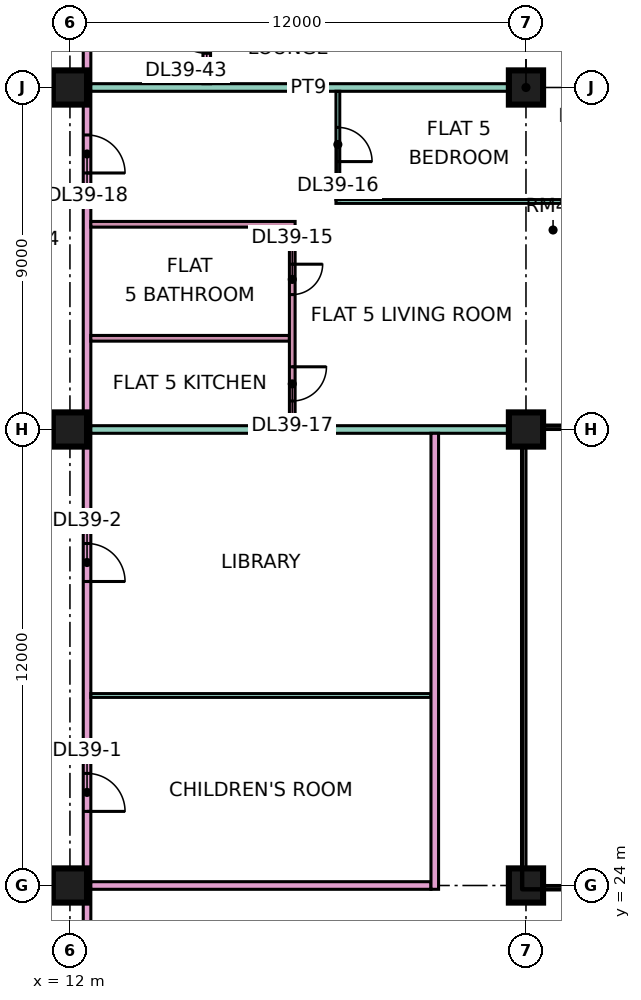
"""IFC4 building model, lengths in metres.
Left out: names, types, materials, properties, quantities, classifications, styles, units other than length and angle.
Written with IfcOpenShell. Run it as: python <this file> out.ifc"""

import sys

from ifc_helpers import new_model, si_unit, direction, frame, frame_2d, origin, origin_2d, place, context, subcontext, project, spatial, rectangle, extrude, element, fill, save


model = new_model("IFC4")
c1 = context("Model", 3, precision=1e-05, world=origin(), true_north=direction((0.0, 1.0)))
c2 = subcontext(c1, "Body", "Model", "MODEL_VIEW")
j1 = project(units=[si_unit("LENGTHUNIT", "METRE"), si_unit("PLANEANGLEUNIT", "RADIAN")], contexts=[c1])
p1 = place(None, origin())
s1 = spatial("IfcSite", under=j1, at=p1, CompositionType="ELEMENT")
p2 = place(p1, origin())
s2 = spatial("IfcBuilding", under=s1, at=p2, CompositionType="ELEMENT")
p3 = place(p2, frame((0.0, 0.0, 172.4)))
s3 = spatial("IfcBuildingStorey", under=s2, at=p3, CompositionType="ELEMENT", Elevation=172.4)
for number, where, z_axis, x_axis in (
    (1, (12.0, 24.0, 0.0), (0.0, 0.0, 1.0), (1.0, 0.0, 0.0)),
    (2, (12.0, 36.0, 0.0), (0.0, 0.0, 1.0), (1.0, 0.0, 0.0)),
    (3, (12.0, 45.0, 0.0), (0.0, 0.0, 1.0), (1.0, 0.0, 0.0)),
    (4, (24.0, 24.0, 0.0), (0.0, 0.0, 1.0), (1.0, 0.0, 0.0)),
    (5, (24.0, 36.0, 0.0), (0.0, 0.0, 1.0), (1.0, 0.0, 0.0)),
    (6, (24.0, 45.0, 0.0), (0.0, 0.0, 1.0), (1.0, 0.0, 0.0)),
):
    element("IfcColumn", number, at=place(p3, frame(where, z_axis=z_axis, x_axis=x_axis)), inside=s3, PredefinedType="COLUMN", context=c2, shape_type="SweptSolid", body=[
        extrude(rectangle(XDim=0.9, YDim=0.9, at=origin_2d()), origin(), (0.0, 0.0, 1.0), 3.75),
    ])
p4 = place(p3, frame((12.45, 20.0, 0.0), z_axis=(0.0, 0.0, 1.0), x_axis=(0.0, 1.0, 0.0)))
e7 = element("IfcWall", 7, at=p4, inside=s3, PredefinedType="PARTITIONING", context=c2, shape_type="SweptSolid", body=[
    extrude(rectangle(XDim=43.0, YDim=0.2, at=frame_2d((21.5, 0.0))), origin(), (0.0, 0.0, 1.0), 3.35),
])
p5 = place(p4, frame((5.95, 0.0, 0.0)))
e8 = element("IfcOpeningElement", 8, at=p5, cuts=e7, PredefinedType="OPENING", context=c2, shape_type="SweptSolid", body=[
    extrude(rectangle(XDim=1.0, YDim=2.1, at=frame_2d((0.5, 1.05))), frame((0.0, 0.11, 0.0), z_axis=(0.0, -1.0, 0.0), x_axis=(1.0, 0.0, 0.0)), (0.0, 0.0, 1.0), 0.22),
])
p6 = place(p4, frame((12.0, 0.0, 0.0)))
e9 = element("IfcOpeningElement", 9, at=p6, cuts=e7, PredefinedType="OPENING", context=c2, shape_type="SweptSolid", body=[
    extrude(rectangle(XDim=1.0, YDim=2.1, at=frame_2d((0.5, 1.05))), frame((0.0, 0.11, 0.0), z_axis=(0.0, -1.0, 0.0), x_axis=(1.0, 0.0, 0.0)), (0.0, 0.0, 1.0), 0.22),
])
p7 = place(p4, frame((22.75, 0.0, 0.0)))
e10 = element("IfcOpeningElement", 10, at=p7, cuts=e7, PredefinedType="OPENING", context=c2, shape_type="SweptSolid", body=[
    extrude(rectangle(XDim=1.0, YDim=2.1, at=frame_2d((0.5, 1.05))), frame((0.0, 0.11, 0.0), z_axis=(0.0, -1.0, 0.0), x_axis=(1.0, 0.0, 0.0)), (0.0, 0.0, 1.0), 0.22),
])
p8 = place(p4, frame((34.75, 0.0, 0.0)))
e11 = element("IfcOpeningElement", 11, at=p8, cuts=e7, PredefinedType="OPENING", context=c2, shape_type="SweptSolid", body=[
    extrude(rectangle(XDim=1.0, YDim=2.1, at=frame_2d((0.5, 1.05))), frame((0.0, 0.11, 0.0), z_axis=(0.0, -1.0, 0.0), x_axis=(1.0, 0.0, 0.0)), (0.0, 0.0, 1.0), 0.22),
])
p9 = place(p4, frame((1.15, 0.0, 0.0)))
e12 = element("IfcOpeningElement", 12, at=p9, cuts=e7, PredefinedType="OPENING", context=c2, shape_type="SweptSolid", body=[
    extrude(rectangle(XDim=1.8, YDim=2.1, at=frame_2d((0.9, 1.05))), frame((0.0, 0.11, 0.0), z_axis=(0.0, -1.0, 0.0), x_axis=(1.0, 0.0, 0.0)), (0.0, 0.0, 1.0), 0.22),
])
p10 = place(p4, frame((28.6, 0.0, 0.0)))
e13 = element("IfcOpeningElement", 13, at=p10, cuts=e7, PredefinedType="OPENING", context=c2, shape_type="SweptSolid", body=[
    extrude(rectangle(XDim=1.8, YDim=2.1, at=frame_2d((0.9, 1.05))), frame((0.0, 0.11, 0.0), z_axis=(0.0, -1.0, 0.0), x_axis=(1.0, 0.0, 0.0)), (0.0, 0.0, 1.0), 0.22),
])
p11 = place(p3, frame((12.55, 24.0, 0.0), z_axis=(0.0, 0.0, 1.0), x_axis=(1.0, 0.0, 0.0)))
e14 = element("IfcWall", 14, at=p11, inside=s3, PredefinedType="PARTITIONING", context=c2, shape_type="SweptSolid", body=[
    extrude(rectangle(XDim=8.95, YDim=0.2, at=frame_2d((4.475, 0.0))), origin(), (0.0, 0.0, 1.0), 3.35),
])
p12 = place(p3, frame((12.55, 29.0, 0.0), z_axis=(0.0, 0.0, 1.0), x_axis=(1.0, 0.0, 0.0)))
e15 = element("IfcWall", 15, at=p12, inside=s3, PredefinedType="PARTITIONING", context=c2, shape_type="SweptSolid", body=[
    extrude(rectangle(XDim=8.95, YDim=0.1, at=frame_2d((4.475, 0.0))), origin(), (0.0, 0.0, 1.0), 3.35),
])
p13 = place(p3, frame((12.55, 36.0, 0.0), z_axis=(0.0, 0.0, 1.0), x_axis=(1.0, 0.0, 0.0)))
e16 = element("IfcWall", 16, at=p13, inside=s3, PredefinedType="PARTITIONING", context=c2, shape_type="SweptSolid", body=[
    extrude(rectangle(XDim=11.45, YDim=0.2, at=frame_2d((5.725, 0.0))), origin(), (0.0, 0.0, 1.0), 3.35),
])
p14 = place(p3, frame((12.55, 38.4, 0.0), z_axis=(0.0, 0.0, 1.0), x_axis=(1.0, 0.0, 0.0)))
e17 = element("IfcWall", 17, at=p14, inside=s3, PredefinedType="PARTITIONING", context=c2, shape_type="SweptSolid", body=[
    extrude(rectangle(XDim=5.225, YDim=0.15, at=frame_2d((2.612, 0.0))), origin(), (0.0, 0.0, 1.0), 3.35),
])
p15 = place(p3, frame((12.55, 41.4, 0.0), z_axis=(0.0, 0.0, 1.0), x_axis=(1.0, 0.0, 0.0)))
e18 = element("IfcWall", 18, at=p15, inside=s3, PredefinedType="PARTITIONING", context=c2, shape_type="SweptSolid", body=[
    extrude(rectangle(XDim=5.375, YDim=0.15, at=frame_2d((2.688, 0.0))), origin(), (0.0, 0.0, 1.0), 3.35),
])
p16 = place(p3, frame((12.55, 45.0, 0.0), z_axis=(0.0, 0.0, 1.0), x_axis=(1.0, 0.0, 0.0)))
e19 = element("IfcWall", 19, at=p16, inside=s3, PredefinedType="PARTITIONING", context=c2, shape_type="SweptSolid", body=[
    extrude(rectangle(XDim=11.45, YDim=0.2, at=frame_2d((5.725, 0.0))), origin(), (0.0, 0.0, 1.0), 3.35),
])
p17 = place(p3, frame((15.6, 45.1, 0.0), z_axis=(0.0, 0.0, 1.0), x_axis=(0.0, 1.0, 0.0)))
e20 = element("IfcWall", 20, at=p17, inside=s3, PredefinedType="PARTITIONING", context=c2, shape_type="SweptSolid", body=[
    extrude(rectangle(XDim=2.675, YDim=0.2, at=frame_2d((1.337, 0.0))), origin(), (0.0, 0.0, 1.0), 3.35),
])
p18 = place(p17, frame((0.8, 0.0, 0.0)))
e21 = element("IfcOpeningElement", 21, at=p18, cuts=e20, PredefinedType="OPENING", context=c2, shape_type="SweptSolid", body=[
    extrude(rectangle(XDim=1.0, YDim=2.1, at=frame_2d((0.5, 1.05))), frame((0.0, 0.11, 0.0), z_axis=(0.0, -1.0, 0.0), x_axis=(1.0, 0.0, 0.0)), (0.0, 0.0, 1.0), 0.22),
])
p19 = place(p3, frame((17.85, 36.1, 0.0), z_axis=(0.0, 0.0, 1.0), x_axis=(0.0, 1.0, 0.0)))
e22 = element("IfcWall", 22, at=p19, inside=s3, PredefinedType="PARTITIONING", context=c2, shape_type="SweptSolid", body=[
    extrude(rectangle(XDim=5.225, YDim=0.15, at=frame_2d((2.612, 0.0))), origin(), (0.0, 0.0, 1.0), 3.35),
])
p20 = place(p19, frame((3.45, 0.0, 0.0)))
e23 = element("IfcOpeningElement", 23, at=p20, cuts=e22, PredefinedType="OPENING", context=c2, shape_type="SweptSolid", body=[
    extrude(rectangle(XDim=0.8, YDim=2.1, at=frame_2d((0.4, 1.05))), frame((0.0, 0.085, 0.0), z_axis=(0.0, -1.0, 0.0), x_axis=(1.0, 0.0, 0.0)), (0.0, 0.0, 1.0), 0.17),
])
p21 = place(p19, frame((0.65, 0.0, 0.0)))
e24 = element("IfcOpeningElement", 24, at=p21, cuts=e22, PredefinedType="OPENING", context=c2, shape_type="SweptSolid", body=[
    extrude(rectangle(XDim=0.9, YDim=2.1, at=frame_2d((0.45, 1.05))), frame((0.0, 0.085, 0.0), z_axis=(0.0, -1.0, 0.0), x_axis=(1.0, 0.0, 0.0)), (0.0, 0.0, 1.0), 0.17),
])
p22 = place(p3, frame((19.0, 42.0, 0.0), z_axis=(0.0, 0.0, 1.0), x_axis=(1.0, 0.0, 0.0)))
e25 = element("IfcWall", 25, at=p22, inside=s3, PredefinedType="PARTITIONING", context=c2, shape_type="SweptSolid", body=[
    extrude(rectangle(XDim=6.35, YDim=0.1, at=frame_2d((3.175, 0.0))), origin(), (0.0, 0.0, 1.0), 3.35),
])
p23 = place(p3, frame((19.05, 42.05, 0.0), z_axis=(0.0, 0.0, 1.0), x_axis=(0.0, 1.0, 0.0)))
e26 = element("IfcWall", 26, at=p23, inside=s3, PredefinedType="PARTITIONING", context=c2, shape_type="SweptSolid", body=[
    extrude(rectangle(XDim=2.85, YDim=0.1, at=frame_2d((1.425, 0.0))), origin(), (0.0, 0.0, 1.0), 3.35),
])
p24 = place(p23, frame((1.0, 0.0, 0.0)))
e27 = element("IfcOpeningElement", 27, at=p24, cuts=e26, PredefinedType="OPENING", context=c2, shape_type="SweptSolid", body=[
    extrude(rectangle(XDim=0.9, YDim=2.1, at=frame_2d((0.45, 1.05))), frame((0.0, 0.06, 0.0), z_axis=(0.0, -1.0, 0.0), x_axis=(1.0, 0.0, 0.0)), (0.0, 0.0, 1.0), 0.12),
])
p25 = place(p3, frame((21.6, 23.9, 0.0), z_axis=(0.0, 0.0, 1.0), x_axis=(0.0, 1.0, 0.0)))
e28 = element("IfcWall", 28, at=p25, inside=s3, PredefinedType="PARTITIONING", context=c2, shape_type="SweptSolid", body=[
    extrude(rectangle(XDim=12.0, YDim=0.2, at=frame_2d((6.0, 0.0))), origin(), (0.0, 0.0, 1.0), 3.35),
])
p26 = place(p5, frame((1.0, 0.0, 0.0), z_axis=(0.0, 0.0, 1.0), x_axis=(-1.0, 0.0, 0.0)))
e29 = element("IfcDoor", 29, at=p26, inside=s3, OperationType="SINGLE_SWING_LEFT", PredefinedType="DOOR", context=c2, shape_type="SweptSolid", body=[
    extrude(rectangle(XDim=1.0, YDim=2.1, at=frame_2d((0.5, 1.05))), frame((0.0, 0.025, 0.0), z_axis=(0.0, -1.0, 0.0), x_axis=(1.0, 0.0, 0.0)), (0.0, 0.0, 1.0), 0.05),
])
fill(e8, e29)
p27 = place(p6, frame((1.0, 0.0, 0.0), z_axis=(0.0, 0.0, 1.0), x_axis=(-1.0, 0.0, 0.0)))
e30 = element("IfcDoor", 30, at=p27, inside=s3, OperationType="SINGLE_SWING_LEFT", PredefinedType="DOOR", context=c2, shape_type="SweptSolid", body=[
    extrude(rectangle(XDim=1.0, YDim=2.1, at=frame_2d((0.5, 1.05))), frame((0.0, 0.025, 0.0), z_axis=(0.0, -1.0, 0.0), x_axis=(1.0, 0.0, 0.0)), (0.0, 0.0, 1.0), 0.05),
])
fill(e9, e30)
p28 = place(p20, origin())
e31 = element("IfcDoor", 31, at=p28, inside=s3, OperationType="SINGLE_SWING_RIGHT", PredefinedType="DOOR", context=c2, shape_type="SweptSolid", body=[
    extrude(rectangle(XDim=0.8, YDim=2.1, at=frame_2d((0.4, 1.05))), frame((0.0, 0.025, 0.0), z_axis=(0.0, -1.0, 0.0), x_axis=(1.0, 0.0, 0.0)), (0.0, 0.0, 1.0), 0.05),
])
fill(e23, e31)
p29 = place(p24, frame((0.9, 0.0, 0.0), z_axis=(0.0, 0.0, 1.0), x_axis=(-1.0, 0.0, 0.0)))
e32 = element("IfcDoor", 32, at=p29, inside=s3, OperationType="SINGLE_SWING_LEFT", PredefinedType="DOOR", context=c2, shape_type="SweptSolid", body=[
    extrude(rectangle(XDim=0.9, YDim=2.1, at=frame_2d((0.45, 1.05))), frame((0.0, 0.025, 0.0), z_axis=(0.0, -1.0, 0.0), x_axis=(1.0, 0.0, 0.0)), (0.0, 0.0, 1.0), 0.05),
])
fill(e27, e32)
p30 = place(p21, origin())
e33 = element("IfcDoor", 33, at=p30, inside=s3, OperationType="SINGLE_SWING_RIGHT", PredefinedType="DOOR", context=c2, shape_type="SweptSolid", body=[
    extrude(rectangle(XDim=0.9, YDim=2.1, at=frame_2d((0.45, 1.05))), frame((0.0, 0.025, 0.0), z_axis=(0.0, -1.0, 0.0), x_axis=(1.0, 0.0, 0.0)), (0.0, 0.0, 1.0), 0.05),
])
fill(e24, e33)
p31 = place(p7, frame((1.0, 0.0, 0.0), z_axis=(0.0, 0.0, 1.0), x_axis=(-1.0, 0.0, 0.0)))
e34 = element("IfcDoor", 34, at=p31, inside=s3, OperationType="SINGLE_SWING_LEFT", PredefinedType="DOOR", context=c2, shape_type="SweptSolid", body=[
    extrude(rectangle(XDim=1.0, YDim=2.1, at=frame_2d((0.5, 1.05))), frame((0.0, 0.025, 0.0), z_axis=(0.0, -1.0, 0.0), x_axis=(1.0, 0.0, 0.0)), (0.0, 0.0, 1.0), 0.05),
])
fill(e10, e34)
p32 = place(p18, frame((1.0, 0.0, 0.0), z_axis=(0.0, 0.0, 1.0), x_axis=(-1.0, 0.0, 0.0)))
e35 = element("IfcDoor", 35, at=p32, inside=s3, OperationType="SINGLE_SWING_RIGHT", PredefinedType="DOOR", context=c2, shape_type="SweptSolid", body=[
    extrude(rectangle(XDim=1.0, YDim=2.1, at=frame_2d((0.5, 1.05))), frame((0.0, 0.025, 0.0), z_axis=(0.0, -1.0, 0.0), x_axis=(1.0, 0.0, 0.0)), (0.0, 0.0, 1.0), 0.05),
])
fill(e21, e35)
save(model, sys.argv[1])
